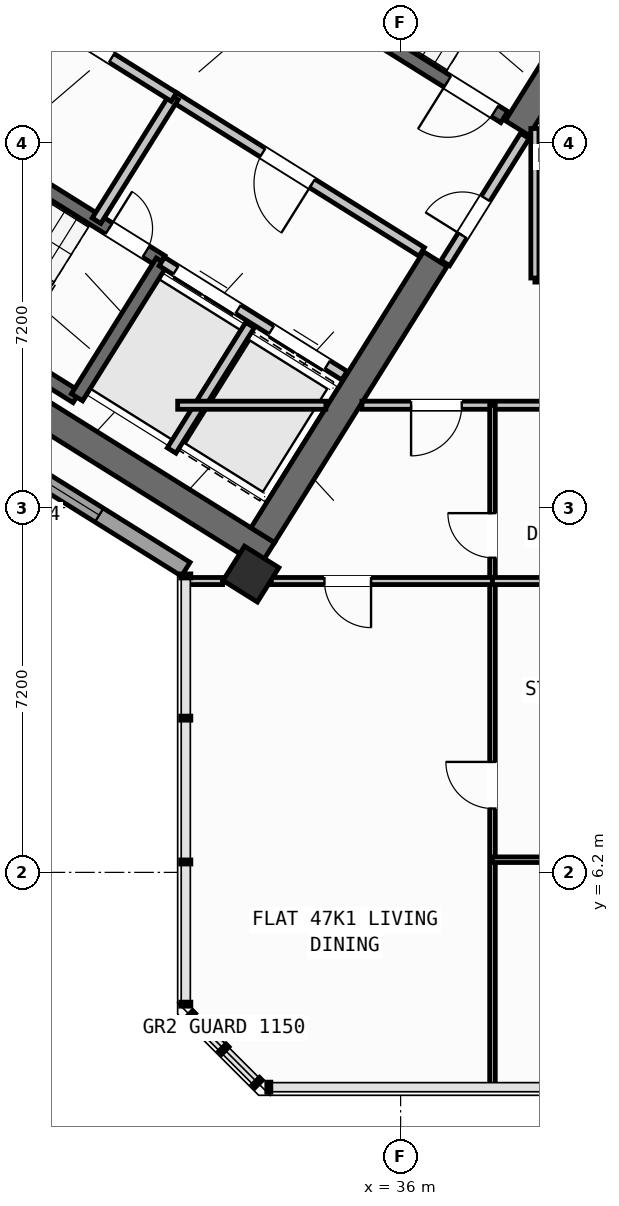
"""IFC4 building model, lengths in metres.
Left out: names, types, materials, properties, quantities, classifications, styles, units other than length and angle.
Written with IfcOpenShell. Run it as: python <this file> out.ifc"""

import sys

from ifc_helpers import new_model, si_unit, direction, frame, frame_2d, origin, origin_2d, place, context, subcontext, project, spatial, rectangle, hollow_rectangle, extrude, source, transform, mapped, element, fill, save


model = new_model("IFC4")
c1 = context("Model", 3, precision=1e-05, world=origin(), true_north=direction((0.0, 1.0)))
c2 = subcontext(c1, "Body", "Model", "MODEL_VIEW")
j1 = project(units=[si_unit("LENGTHUNIT", "METRE"), si_unit("PLANEANGLEUNIT", "RADIAN")], contexts=[c1])
p1 = place(None, origin())
s1 = spatial("IfcSite", under=j1, at=p1, CompositionType="ELEMENT")
p2 = place(p1, origin())
s2 = spatial("IfcBuilding", under=s1, at=p2, CompositionType="ELEMENT")
p3 = place(p2, frame((0.0, 0.0, 187.8)))
s3 = spatial("IfcBuildingStorey", under=s2, at=p3, CompositionType="ELEMENT", Elevation=187.8)
p4 = place(p3, frame((33.366, 12.477, 0.0), z_axis=(0.0, 0.0, 1.0), x_axis=(-0.848047359947, 0.529920442413, 0.0)))
e1 = element("IfcWall", 1, at=p4, inside=s3, PredefinedType="SHEAR", context=c2, shape_type="SweptSolid", body=[
    extrude(rectangle(XDim=13.14, YDim=0.55, at=frame_2d((6.57, 0.0))), origin(), (0.0, 0.0, 1.0), 3.35),
])
p5 = place(p3, frame((40.194, 23.922, 0.0), z_axis=(0.0, 0.0, 1.0), x_axis=(-0.529888438328, -0.848067357541, 0.0)))
e2 = element("IfcWall", 2, at=p5, inside=s3, PredefinedType="SHEAR", context=c2, shape_type="SweptSolid", body=[
    extrude(rectangle(XDim=3.575, YDim=0.55, at=frame_2d((1.788, 0.0))), origin(), (0.0, 0.0, 1.0), 3.35),
])
p6 = place(p3, frame((36.683, 18.304, 0.0), z_axis=(0.0, 0.0, 1.0), x_axis=(-0.529896466841, -0.848062341122, 0.0)))
e3 = element("IfcWall", 3, at=p6, inside=s3, PredefinedType="SHEAR", context=c2, shape_type="SweptSolid", body=[
    extrude(rectangle(XDim=6.425, YDim=0.55, at=frame_2d((3.212, 0.0))), origin(), (0.0, 0.0, 1.0), 3.35),
])
m1 = source(origin(), c2, "Body", "SweptSolid", [
    extrude(hollow_rectangle(XDim=0.8, YDim=0.8, WallThickness=0.032, at=origin_2d()), origin(), (0.0, 0.0, 1.0), 3.6),
])
p7 = place(p3, frame((33.046, 12.087, 0.0), z_axis=(0.0, 0.0, 1.0), x_axis=(-0.848048096156, 0.529919264233, 0.0)))
e4 = element("IfcColumn", 4, at=p7, inside=s3, PredefinedType="COLUMN", context=c2, shape_type="MappedRepresentation", body=[
    mapped(m1, transform((0.0, 0.0, 0.0), scale=1.0)),
])
p8 = place(p3, frame((31.76, 12.183, 0.0), z_axis=(0.0, 0.0, 1.0), x_axis=(-0.848047074256, 0.529920899612, 0.0)))
e5 = element("IfcWall", 5, at=p8, inside=s3, PredefinedType="STANDARD", context=c2, shape_type="SweptSolid", body=[
    extrude(rectangle(XDim=30.652, YDim=0.32, at=frame_2d((15.326, 0.0))), origin(), (0.0, 0.0, 1.0), 3.35),
])
p9 = place(p8, frame((15.166, 0.0, 0.0)))
e6 = element("IfcOpeningElement", 6, at=p9, cuts=e5, PredefinedType="OPENING", context=c2, shape_type="SweptSolid", body=[
    extrude(rectangle(XDim=1.2, YDim=2.15, at=frame_2d((0.6, 1.075))), frame((0.0, 0.17, 0.0), z_axis=(0.0, -1.0, 0.0), x_axis=(1.0, 0.0, 0.0)), (0.0, 0.0, 1.0), 0.34),
])
p10 = place(p8, frame((2.015, 0.0, 0.8)))
e7 = element("IfcOpeningElement", 7, at=p10, cuts=e5, PredefinedType="OPENING", context=c2, shape_type="SweptSolid", body=[
    extrude(rectangle(XDim=2.1, YDim=1.55, at=frame_2d((1.05, 0.775))), frame((0.0, 0.17, 0.0), z_axis=(0.0, -1.0, 0.0), x_axis=(1.0, 0.0, 0.0)), (0.0, 0.0, 1.0), 0.34),
])
p11 = place(p8, frame((7.244, 0.0, 0.8)))
e8 = element("IfcOpeningElement", 8, at=p11, cuts=e5, PredefinedType="OPENING", context=c2, shape_type="SweptSolid", body=[
    extrude(rectangle(XDim=2.1, YDim=1.55, at=frame_2d((1.05, 0.775))), frame((0.0, 0.17, 0.0), z_axis=(0.0, -1.0, 0.0), x_axis=(1.0, 0.0, 0.0)), (0.0, 0.0, 1.0), 0.34),
])
p12 = place(p8, frame((12.623, 0.0, 1.0)))
e9 = element("IfcOpeningElement", 9, at=p12, cuts=e5, PredefinedType="OPENING", context=c2, shape_type="SweptSolid", body=[
    extrude(rectangle(XDim=0.9, YDim=1.25, at=frame_2d((0.45, 0.625))), frame((0.0, 0.17, 0.0), z_axis=(0.0, -1.0, 0.0), x_axis=(1.0, 0.0, 0.0)), (0.0, 0.0, 1.0), 0.34),
])
p13 = place(p8, frame((19.565, 0.0, 0.95)))
e10 = element("IfcOpeningElement", 10, at=p13, cuts=e5, PredefinedType="OPENING", context=c2, shape_type="SweptSolid", body=[
    extrude(rectangle(XDim=1.2, YDim=1.4, at=frame_2d((0.6, 0.7))), frame((0.0, 0.17, 0.0), z_axis=(0.0, -1.0, 0.0), x_axis=(1.0, 0.0, 0.0)), (0.0, 0.0, 1.0), 0.34),
])
p14 = place(p8, frame((25.983, 0.0, 1.0)))
e11 = element("IfcOpeningElement", 11, at=p14, cuts=e5, PredefinedType="OPENING", context=c2, shape_type="SweptSolid", body=[
    extrude(rectangle(XDim=0.9, YDim=1.25, at=frame_2d((0.45, 0.625))), frame((0.0, 0.17, 0.0), z_axis=(0.0, -1.0, 0.0), x_axis=(1.0, 0.0, 0.0)), (0.0, 0.0, 1.0), 0.34),
])
p15 = place(p8, frame((28.433, 0.0, 1.0)))
e12 = element("IfcOpeningElement", 12, at=p15, cuts=e5, PredefinedType="OPENING", context=c2, shape_type="SweptSolid", body=[
    extrude(rectangle(XDim=0.9, YDim=1.25, at=frame_2d((0.45, 0.625))), frame((0.0, 0.17, 0.0), z_axis=(0.0, -1.0, 0.0), x_axis=(1.0, 0.0, 0.0)), (0.0, 0.0, 1.0), 0.34),
])
p16 = place(p3, frame((29.605, 15.581, 0.0), z_axis=(0.0, 0.0, 1.0), x_axis=(-0.848036911448, 0.529937163087, 0.0)))
e13 = element("IfcWall", 13, at=p16, inside=s3, PredefinedType="SHEAR", context=c2, shape_type="SweptSolid", body=[
    extrude(rectangle(XDim=7.46, YDim=0.26, at=frame_2d((3.73, 0.0))), origin(), (0.0, 0.0, 1.0), 3.35),
])
p17 = place(p3, frame((31.28, 18.261, 0.0), z_axis=(0.0, 0.0, 1.0), x_axis=(-0.848051618787, 0.529913626805, 0.0)))
e14 = element("IfcWall", 14, at=p17, inside=s3, PredefinedType="SHEAR", context=c2, shape_type="SweptSolid", body=[
    extrude(rectangle(XDim=7.46, YDim=0.26, at=frame_2d((3.73, 0.0))), origin(), (0.0, 0.0, 1.0), 3.35),
])
p18 = place(p17, frame((0.36, 0.0, 0.0)))
e15 = element("IfcOpeningElement", 15, at=p18, cuts=e14, PredefinedType="OPENING", context=c2, shape_type="SweptSolid", body=[
    extrude(rectangle(XDim=0.86, YDim=2.05, at=frame_2d((0.43, 1.025))), frame((0.0, 0.14, 0.0), z_axis=(0.0, -1.0, 0.0), x_axis=(1.0, 0.0, 0.0)), (0.0, 0.0, 1.0), 0.28),
])
p19 = place(p3, frame((31.288, 18.256, 0.0), z_axis=(0.0, 0.0, 1.0), x_axis=(-0.529943379326, -0.848033026897, 0.0)))
e16 = element("IfcWall", 16, at=p19, inside=s3, PredefinedType="SHEAR", context=c2, shape_type="SweptSolid", body=[
    extrude(rectangle(XDim=3.16, YDim=0.26, at=frame_2d((1.58, 0.0))), origin(), (0.0, 0.0, 1.0), 3.35),
])
p20 = place(p3, frame((38.046, 21.108, 0.0), z_axis=(0.0, 0.0, 1.0), x_axis=(-0.848054434086, 0.529909121291, 0.0)))
e17 = element("IfcWall", 17, at=p20, inside=s3, PredefinedType="SHEAR", context=c2, shape_type="SweptSolid", body=[
    extrude(rectangle(XDim=7.33, YDim=0.26, at=frame_2d((3.665, 0.0))), origin(), (0.0, 0.0, 1.0), 3.35),
])
p21 = place(p20, frame((0.22, 0.0, 0.0)))
e18 = element("IfcOpeningElement", 18, at=p21, cuts=e17, PredefinedType="OPENING", context=c2, shape_type="SweptSolid", body=[
    extrude(rectangle(XDim=1.1, YDim=2.1, at=frame_2d((0.55, 1.05))), frame((0.0, 0.14, 0.0), z_axis=(0.0, -1.0, 0.0), x_axis=(1.0, 0.0, 0.0)), (0.0, 0.0, 1.0), 0.28),
])
p22 = place(p3, frame((34.891, 16.005, 0.0), z_axis=(0.0, 0.0, 1.0), x_axis=(-0.848062873452, 0.529895614884, 0.0)))
e19 = element("IfcWall", 19, at=p22, inside=s3, PredefinedType="STANDARD", context=c2, shape_type="SweptSolid", body=[
    extrude(rectangle(XDim=4.248, YDim=0.2, at=frame_2d((2.124, 0.0))), origin(), (0.0, 0.0, 1.0), 3.34),
])
p23 = place(p22, frame((0.398, 0.0, 0.0)))
e20 = element("IfcOpeningElement", 20, at=p23, cuts=e19, PredefinedType="OPENING", context=c2, shape_type="SweptSolid", body=[
    extrude(rectangle(XDim=1.3, YDim=2.2, at=frame_2d((0.65, 1.1))), frame((0.0, 0.11, 0.0), z_axis=(0.0, -1.0, 0.0), x_axis=(1.0, 0.0, 0.0)), (0.0, 0.0, 1.0), 0.22),
])
p24 = place(p22, frame((2.473, 0.0, 0.0)))
e21 = element("IfcOpeningElement", 21, at=p24, cuts=e19, PredefinedType="OPENING", context=c2, shape_type="SweptSolid", body=[
    extrude(rectangle(XDim=1.45, YDim=2.25, at=frame_2d((0.725, 1.125))), frame((0.0, 0.11, 0.0), z_axis=(0.0, -1.0, 0.0), x_axis=(1.0, 0.0, 0.0)), (0.0, 0.0, 1.0), 0.22),
])
p25 = place(p3, frame((36.417, 18.447, 0.0), z_axis=(0.0, 0.0, 1.0), x_axis=(-0.848064879198, 0.529892404805, 0.0)))
e22 = element("IfcWall", 22, at=p25, inside=s3, PredefinedType="STANDARD", context=c2, shape_type="SweptSolid", body=[
    extrude(rectangle(XDim=5.768, YDim=0.2, at=frame_2d((2.884, 0.0))), origin(), (0.0, 0.0, 1.0), 3.34),
])
p26 = place(p25, frame((2.548, 0.0, 0.0)))
e23 = element("IfcOpeningElement", 23, at=p26, cuts=e22, PredefinedType="OPENING", context=c2, shape_type="SweptSolid", body=[
    extrude(rectangle(XDim=1.15, YDim=2.1, at=frame_2d((0.575, 1.05))), frame((0.0, 0.11, 0.0), z_axis=(0.0, -1.0, 0.0), x_axis=(1.0, 0.0, 0.0)), (0.0, 0.0, 1.0), 0.22),
])
p27 = place(p3, frame((33.029, 17.003, 0.0), z_axis=(0.0, 0.0, 1.0), x_axis=(-0.529916267533, -0.848049968695, 0.0)))
e24 = element("IfcWall", 24, at=p27, inside=s3, PredefinedType="STANDARD", context=c2, shape_type="SweptSolid", body=[
    extrude(rectangle(XDim=2.92, YDim=0.2, at=frame_2d((1.46, 0.0))), origin(), (0.0, 0.0, 1.0), 3.34),
])
p28 = place(p3, frame((31.525, 21.504, 0.0), z_axis=(0.0, 0.0, 1.0), x_axis=(-0.529907497854, -0.848055448493, 0.0)))
e25 = element("IfcWall", 25, at=p28, inside=s3, PredefinedType="STANDARD", context=c2, shape_type="SweptSolid", body=[
    extrude(rectangle(XDim=2.88, YDim=0.2, at=frame_2d((1.44, 0.0))), origin(), (0.0, 0.0, 1.0), 3.34),
])
p29 = place(p3, frame((31.525, 21.504, 0.0), z_axis=(0.0, 0.0, 1.0), x_axis=(-0.848040211232, 0.529931882541, 0.0)))
e26 = element("IfcWall", 26, at=p29, inside=s3, PredefinedType="STANDARD", context=c2, shape_type="SweptSolid", body=[
    extrude(rectangle(XDim=6.218, YDim=0.2, at=frame_2d((3.109, 0.0))), origin(), (0.0, 0.0, 1.0), 3.34),
])
p30 = place(p29, frame((4.4, 0.0, 0.0)))
e27 = element("IfcOpeningElement", 27, at=p30, cuts=e26, PredefinedType="OPENING", context=c2, shape_type="SweptSolid", body=[
    extrude(rectangle(XDim=0.86, YDim=2.05, at=frame_2d((0.43, 1.025))), frame((0.0, 0.11, 0.0), z_axis=(0.0, -1.0, 0.0), x_axis=(1.0, 0.0, 0.0)), (0.0, 0.0, 1.0), 0.22),
])
p31 = place(p29, frame((1.45, 0.0, 0.0)))
e28 = element("IfcOpeningElement", 28, at=p31, cuts=e26, PredefinedType="OPENING", context=c2, shape_type="SweptSolid", body=[
    extrude(rectangle(XDim=0.86, YDim=2.05, at=frame_2d((0.43, 1.025))), frame((0.0, 0.11, 0.0), z_axis=(0.0, -1.0, 0.0), x_axis=(1.0, 0.0, 0.0)), (0.0, 0.0, 1.0), 0.22),
])
p32 = place(p3, frame((38.451, 20.737, 0.0), z_axis=(0.0, 0.0, 1.0), x_axis=(-0.529924799939, -0.848044637038, 0.0)))
e29 = element("IfcWall", 29, at=p32, inside=s3, PredefinedType="STANDARD", context=c2, shape_type="SweptSolid", body=[
    extrude(rectangle(XDim=2.96, YDim=0.2, at=frame_2d((1.48, 0.0))), origin(), (0.0, 0.0, 1.0), 3.34),
])
p33 = place(p32, frame((1.46, 0.0, 0.0)))
e30 = element("IfcOpeningElement", 30, at=p33, cuts=e29, PredefinedType="OPENING", context=c2, shape_type="SweptSolid", body=[
    extrude(rectangle(XDim=0.86, YDim=2.05, at=frame_2d((0.43, 1.025))), frame((0.0, 0.11, 0.0), z_axis=(0.0, -1.0, 0.0), x_axis=(1.0, 0.0, 0.0)), (0.0, 0.0, 1.0), 0.22),
])
p34 = place(p3, frame((31.6, 15.42, 0.0), z_axis=(0.0, 0.0, 1.0), x_axis=(1.0, 0.0, 0.0)))
e31 = element("IfcWall", 31, at=p34, inside=s3, PredefinedType="PARTITIONING", context=c2, shape_type="SweptSolid", body=[
    extrude(rectangle(XDim=2.925, YDim=0.16, at=frame_2d((1.462, 0.0))), origin(), (0.0, 0.0, 1.0), 3.34),
])
p35 = place(p3, frame((35.237, 15.42, 0.0), z_axis=(0.0, 0.0, 1.0), x_axis=(1.0, 0.0, 0.0)))
e32 = element("IfcWall", 32, at=p35, inside=s3, PredefinedType="PARTITIONING", context=c2, shape_type="SweptSolid", body=[
    extrude(rectangle(XDim=15.432, YDim=0.16, at=frame_2d((7.716, 0.0))), origin(), (0.0, 0.0, 1.0), 3.34),
])
p36 = place(p35, frame((0.969, 0.0, 0.0)))
e33 = element("IfcOpeningElement", 33, at=p36, cuts=e32, PredefinedType="OPENING", context=c2, shape_type="SweptSolid", body=[
    extrude(rectangle(XDim=1.0, YDim=2.1, at=frame_2d((0.5, 1.05))), frame((0.0, 0.09, 0.0), z_axis=(0.0, -1.0, 0.0), x_axis=(1.0, 0.0, 0.0)), (0.0, 0.0, 1.0), 0.18),
])
p37 = place(p35, frame((8.799, 0.0, 0.0)))
e34 = element("IfcOpeningElement", 34, at=p37, cuts=e32, PredefinedType="OPENING", context=c2, shape_type="SweptSolid", body=[
    extrude(rectangle(XDim=1.0, YDim=2.1, at=frame_2d((0.5, 1.05))), frame((0.0, 0.09, 0.0), z_axis=(0.0, -1.0, 0.0), x_axis=(1.0, 0.0, 0.0)), (0.0, 0.0, 1.0), 0.18),
])
p38 = place(p3, frame((38.65, 17.93, 0.0), z_axis=(0.0, 0.0, 1.0), x_axis=(1.0, 0.0, 0.0)))
e35 = element("IfcWall", 35, at=p38, inside=s3, PredefinedType="PARTITIONING", context=c2, shape_type="SweptSolid", body=[
    extrude(rectangle(XDim=9.95, YDim=0.16, at=frame_2d((4.975, 0.0))), origin(), (0.0, 0.0, 1.0), 3.34),
])
p39 = place(p38, frame((4.475, 0.0, 0.0)))
e36 = element("IfcOpeningElement", 36, at=p39, cuts=e35, PredefinedType="OPENING", context=c2, shape_type="SweptSolid", body=[
    extrude(rectangle(XDim=1.0, YDim=2.1, at=frame_2d((0.5, 1.05))), frame((0.0, 0.09, 0.0), z_axis=(0.0, -1.0, 0.0), x_axis=(1.0, 0.0, 0.0)), (0.0, 0.0, 1.0), 0.18),
])
p40 = place(p3, frame((38.65, 17.93, 0.0), z_axis=(0.0, 0.0, 1.0), x_axis=(0.0, 1.0, 0.0)))
e37 = element("IfcWall", 37, at=p40, inside=s3, PredefinedType="PARTITIONING", context=c2, shape_type="SweptSolid", body=[
    extrude(rectangle(XDim=2.951, YDim=0.16, at=frame_2d((1.476, 0.0))), origin(), (0.0, 0.0, 1.0), 3.34),
])
p41 = place(p3, frame((37.813, 1.96, 0.0), z_axis=(0.0, 0.0, 1.0), x_axis=(0.0, 1.0, 0.0)))
e38 = element("IfcWall", 38, at=p41, inside=s3, PredefinedType="PARTITIONING", context=c2, shape_type="SweptSolid", body=[
    extrude(rectangle(XDim=13.46, YDim=0.11, at=frame_2d((6.73, 0.0))), origin(), (0.0, 0.0, 1.0), 3.34),
])
p42 = place(p41, frame((5.5, 0.0, 0.0)))
e39 = element("IfcOpeningElement", 39, at=p42, cuts=e38, PredefinedType="OPENING", context=c2, shape_type="SweptSolid", body=[
    extrude(rectangle(XDim=0.92, YDim=2.08, at=frame_2d((0.46, 1.04))), frame((0.0, 0.065, 0.0), z_axis=(0.0, -1.0, 0.0), x_axis=(1.0, 0.0, 0.0)), (0.0, 0.0, 1.0), 0.13),
])
p43 = place(p41, frame((10.45, 0.0, 0.0)))
e40 = element("IfcOpeningElement", 40, at=p43, cuts=e38, PredefinedType="OPENING", context=c2, shape_type="SweptSolid", body=[
    extrude(rectangle(XDim=0.88, YDim=2.08, at=frame_2d((0.44, 1.04))), frame((0.0, 0.065, 0.0), z_axis=(0.0, -1.0, 0.0), x_axis=(1.0, 0.0, 0.0)), (0.0, 0.0, 1.0), 0.13),
])
p44 = place(p3, frame((31.74, 11.95, 0.0), z_axis=(0.0, 0.0, 1.0), x_axis=(1.0, 0.0, 0.0)))
e41 = element("IfcWall", 41, at=p44, inside=s3, PredefinedType="PLUMBINGWALL", context=c2, shape_type="SweptSolid", body=[
    extrude(rectangle(XDim=0.748, YDim=0.14, at=frame_2d((0.374, 0.0))), origin(), (0.0, 0.0, 1.0), 3.34),
])
p45 = place(p3, frame((33.447, 11.95, 0.0), z_axis=(0.0, 0.0, 1.0), x_axis=(1.0, 0.0, 0.0)))
e42 = element("IfcWall", 42, at=p45, inside=s3, PredefinedType="PLUMBINGWALL", context=c2, shape_type="SweptSolid", body=[
    extrude(rectangle(XDim=4.366, YDim=0.14, at=frame_2d((2.183, 0.0))), origin(), (0.0, 0.0, 1.0), 2.525),
])
p46 = place(p45, frame((1.05, 0.0, 0.0)))
e43 = element("IfcOpeningElement", 43, at=p46, cuts=e42, PredefinedType="OPENING", context=c2, shape_type="SweptSolid", body=[
    extrude(rectangle(XDim=0.92, YDim=2.08, at=frame_2d((0.46, 1.04))), frame((0.0, 0.08, 0.0), z_axis=(0.0, -1.0, 0.0), x_axis=(1.0, 0.0, 0.0)), (0.0, 0.0, 1.0), 0.16),
])
p47 = place(p3, frame((37.813, 11.95, 0.0), z_axis=(0.0, 0.0, 1.0), x_axis=(1.0, 0.0, 0.0)))
e44 = element("IfcWall", 44, at=p47, inside=s3, PredefinedType="PLUMBINGWALL", context=c2, shape_type="SweptSolid", body=[
    extrude(rectangle(XDim=4.137, YDim=0.14, at=frame_2d((2.068, 0.0))), origin(), (0.0, 0.0, 1.0), 2.525),
])
p48 = place(p3, frame((37.813, 6.45, 0.0), z_axis=(0.0, 0.0, 1.0), x_axis=(1.0, 0.0, 0.0)))
e45 = element("IfcWall", 45, at=p48, inside=s3, PredefinedType="PARTITIONING", context=c2, shape_type="SweptSolid", body=[
    extrude(rectangle(XDim=4.137, YDim=0.11, at=frame_2d((2.068, 0.0))), origin(), (0.0, 0.0, 1.0), 3.34),
])
p49 = place(p48, frame((1.608, 0.0, 0.0)))
e46 = element("IfcOpeningElement", 46, at=p49, cuts=e45, PredefinedType="OPENING", context=c2, shape_type="SweptSolid", body=[
    extrude(rectangle(XDim=0.92, YDim=2.08, at=frame_2d((0.46, 1.04))), frame((0.0, 0.065, 0.0), z_axis=(0.0, -1.0, 0.0), x_axis=(1.0, 0.0, 0.0)), (0.0, 0.0, 1.0), 0.13),
])
m2 = source(origin(), c2, "Body", "SweptSolid", [
    extrude(rectangle(XDim=2.1, YDim=1.55, at=frame_2d((1.05, 0.775))), frame((0.0, 0.03, 0.0), z_axis=(0.0, -1.0, 0.0), x_axis=(1.0, 0.0, 0.0)), (0.0, 0.0, 1.0), 0.06),
])
p50 = place(p10, origin())
e47 = element("IfcWindow", 47, at=p50, inside=s3, PartitioningType="SINGLE_PANEL", PredefinedType="WINDOW", context=c2, shape_type="MappedRepresentation", body=[
    mapped(m2, transform((0.0, 0.0, 0.0), scale=1.0)),
])
fill(e7, e47)
m3 = source(origin(), c2, "Body", "SweptSolid", [
    extrude(rectangle(XDim=0.86, YDim=2.05, at=frame_2d((0.43, 1.025))), frame((0.0, 0.025, 0.0), z_axis=(0.0, -1.0, 0.0), x_axis=(1.0, 0.0, 0.0)), (0.0, 0.0, 1.0), 0.05),
])
p51 = place(p18, frame((0.86, 0.0, 0.0), z_axis=(0.0, 0.0, 1.0), x_axis=(-1.0, 0.0, 0.0)))
e48 = element("IfcDoor", 48, at=p51, inside=s3, OperationType="SINGLE_SWING_LEFT", PredefinedType="DOOR", context=c2, shape_type="MappedRepresentation", body=[
    mapped(m3, transform((0.0, 0.0, 0.0), scale=1.0)),
])
fill(e15, e48)
m4 = source(origin(), c2, "Body", "SweptSolid", [
    extrude(rectangle(XDim=1.1, YDim=2.1, at=frame_2d((0.55, 1.05))), frame((0.0, 0.025, 0.0), z_axis=(0.0, -1.0, 0.0), x_axis=(1.0, 0.0, 0.0)), (0.0, 0.0, 1.0), 0.05),
])
p52 = place(p21, origin())
e49 = element("IfcDoor", 49, at=p52, inside=s3, OperationType="SINGLE_SWING_RIGHT", PredefinedType="DOOR", context=c2, shape_type="MappedRepresentation", body=[
    mapped(m4, transform((0.0, 0.0, 0.0), scale=1.0)),
])
fill(e18, e49)
m5 = source(origin(), c2, "Body", "SweptSolid", [
    extrude(rectangle(XDim=1.15, YDim=2.1, at=frame_2d((0.575, 1.05))), frame((0.0, 0.025, 0.0), z_axis=(0.0, -1.0, 0.0), x_axis=(1.0, 0.0, 0.0)), (0.0, 0.0, 1.0), 0.05),
])
p53 = place(p26, origin())
e50 = element("IfcDoor", 50, at=p53, inside=s3, OperationType="SINGLE_SWING_LEFT", PredefinedType="DOOR", context=c2, shape_type="MappedRepresentation", body=[
    mapped(m5, transform((0.0, 0.0, 0.0), scale=1.0)),
])
fill(e23, e50)
m6 = source(origin(), c2, "Body", "SweptSolid", [
    extrude(rectangle(XDim=1.3, YDim=2.2, at=frame_2d((0.65, 1.1))), frame((0.0, 0.025, 0.0), z_axis=(0.0, -1.0, 0.0), x_axis=(1.0, 0.0, 0.0)), (0.0, 0.0, 1.0), 0.05),
])
p54 = place(p23, origin())
e51 = element("IfcDoor", 51, at=p54, inside=s3, OperationType="DOUBLE_DOOR_SLIDING", PredefinedType="DOOR", context=c2, shape_type="MappedRepresentation", body=[
    mapped(m6, transform((0.0, 0.0, 0.0), scale=1.0)),
])
fill(e20, e51)
m7 = source(origin(), c2, "Body", "SweptSolid", [
    extrude(rectangle(XDim=1.45, YDim=2.25, at=frame_2d((0.725, 1.125))), frame((0.0, 0.025, 0.0), z_axis=(0.0, -1.0, 0.0), x_axis=(1.0, 0.0, 0.0)), (0.0, 0.0, 1.0), 0.05),
])
p55 = place(p24, origin())
e52 = element("IfcDoor", 52, at=p55, inside=s3, OperationType="DOUBLE_DOOR_SLIDING", PredefinedType="DOOR", context=c2, shape_type="MappedRepresentation", body=[
    mapped(m7, transform((0.0, 0.0, 0.0), scale=1.0)),
])
fill(e21, e52)
p56 = place(p31, frame((0.86, 0.0, 0.0), z_axis=(0.0, 0.0, 1.0), x_axis=(-1.0, 0.0, 0.0)))
e53 = element("IfcDoor", 53, at=p56, inside=s3, OperationType="SINGLE_SWING_LEFT", PredefinedType="DOOR", context=c2, shape_type="MappedRepresentation", body=[
    mapped(m3, transform((0.0, 0.0, 0.0), scale=1.0)),
])
fill(e28, e53)
p57 = place(p33, frame((0.86, 0.0, 0.0), z_axis=(0.0, 0.0, 1.0), x_axis=(-1.0, 0.0, 0.0)))
e54 = element("IfcDoor", 54, at=p57, inside=s3, OperationType="SINGLE_SWING_LEFT", PredefinedType="DOOR", context=c2, shape_type="MappedRepresentation", body=[
    mapped(m3, transform((0.0, 0.0, 0.0), scale=1.0)),
])
fill(e30, e54)
m8 = source(origin(), c2, "Body", "SweptSolid", [
    extrude(rectangle(XDim=0.92, YDim=2.08, at=frame_2d((0.46, 1.04))), frame((0.0, 0.025, 0.0), z_axis=(0.0, -1.0, 0.0), x_axis=(1.0, 0.0, 0.0)), (0.0, 0.0, 1.0), 0.05),
])
p58 = place(p42, origin())
e55 = element("IfcDoor", 55, at=p58, inside=s3, OperationType="SINGLE_SWING_RIGHT", PredefinedType="DOOR", context=c2, shape_type="MappedRepresentation", body=[
    mapped(m8, transform((0.0, 0.0, 0.0), scale=1.0)),
])
fill(e39, e55)
m9 = source(origin(), c2, "Body", "SweptSolid", [
    extrude(rectangle(XDim=1.0, YDim=2.1, at=frame_2d((0.5, 1.05))), frame((0.0, 0.025, 0.0), z_axis=(0.0, -1.0, 0.0), x_axis=(1.0, 0.0, 0.0)), (0.0, 0.0, 1.0), 0.05),
])
p59 = place(p36, frame((1.0, 0.0, 0.0), z_axis=(0.0, 0.0, 1.0), x_axis=(-1.0, 0.0, 0.0)))
e56 = element("IfcDoor", 56, at=p59, inside=s3, OperationType="SINGLE_SWING_RIGHT", PredefinedType="DOOR", context=c2, shape_type="MappedRepresentation", body=[
    mapped(m9, transform((0.0, 0.0, 0.0), scale=1.0)),
])
fill(e33, e56)
p60 = place(p46, frame((0.92, 0.0, 0.0), z_axis=(0.0, 0.0, 1.0), x_axis=(-1.0, 0.0, 0.0)))
e57 = element("IfcDoor", 57, at=p60, inside=s3, OperationType="SINGLE_SWING_LEFT", PredefinedType="DOOR", context=c2, shape_type="MappedRepresentation", body=[
    mapped(m8, transform((0.0, 0.0, 0.0), scale=1.0)),
])
fill(e43, e57)
m10 = source(origin(), c2, "Body", "SweptSolid", [
    extrude(rectangle(XDim=0.88, YDim=2.08, at=frame_2d((0.44, 1.04))), frame((0.0, 0.025, 0.0), z_axis=(0.0, -1.0, 0.0), x_axis=(1.0, 0.0, 0.0)), (0.0, 0.0, 1.0), 0.05),
])
p61 = place(p43, origin())
e58 = element("IfcDoor", 58, at=p61, inside=s3, OperationType="SINGLE_SWING_RIGHT", PredefinedType="DOOR", context=c2, shape_type="MappedRepresentation", body=[
    mapped(m10, transform((0.0, 0.0, 0.0), scale=1.0)),
])
fill(e40, e58)
save(model, sys.argv[1])
